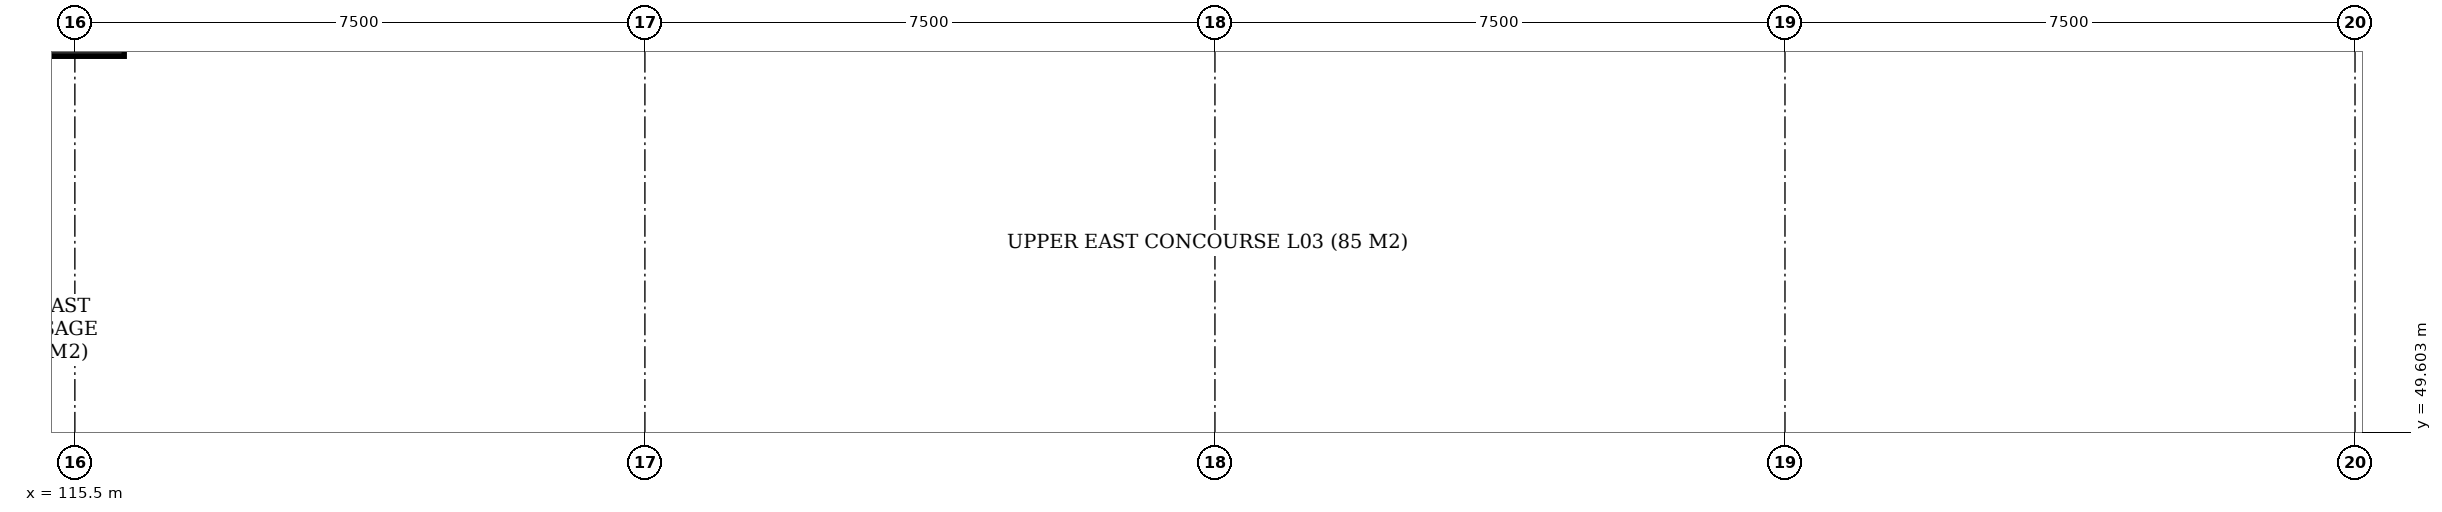
"""IFC4 building model, lengths in metres.
Left out: names, types, materials, properties, quantities, classifications, styles, units other than length and angle.
Written with IfcOpenShell. Run it as: python <this file> out.ifc"""

import sys

from ifc_helpers import new_model, si_unit, direction, frame, origin, origin_2d, place, context, subcontext, project, spatial, rectangle, extrude, element, save


model = new_model("IFC4")
c1 = context("Model", 3, precision=1e-05, world=origin(), true_north=direction((0.0, 1.0)))
c2 = subcontext(c1, "Body", "Model", "MODEL_VIEW")
j1 = project(units=[si_unit("LENGTHUNIT", "METRE"), si_unit("PLANEANGLEUNIT", "RADIAN")], contexts=[c1])
p1 = place(None, origin())
s1 = spatial("IfcSite", under=j1, at=p1, CompositionType="ELEMENT")
p2 = place(p1, origin())
s2 = spatial("IfcBuilding", under=s1, at=p2, CompositionType="ELEMENT")
p3 = place(p2, frame((0.0, 0.0, 14.0)))
s3 = spatial("IfcBuildingStorey", under=s2, at=p3, CompositionType="ELEMENT", Elevation=14.0)
p4 = place(p3, frame((115.5, 55.2, -0.28), z_axis=(0.0, 0.0, 1.0), x_axis=(1.0, 0.0, 0.0)))
e1 = element("IfcColumn", 1, at=p4, inside=s3, PredefinedType="COLUMN", context=c2, shape_type="SweptSolid", body=[
    extrude(rectangle(XDim=1.3, YDim=1.3, at=origin_2d()), origin(), (0.0, 0.0, 1.0), 9.93),
])
save(model, sys.argv[1])
